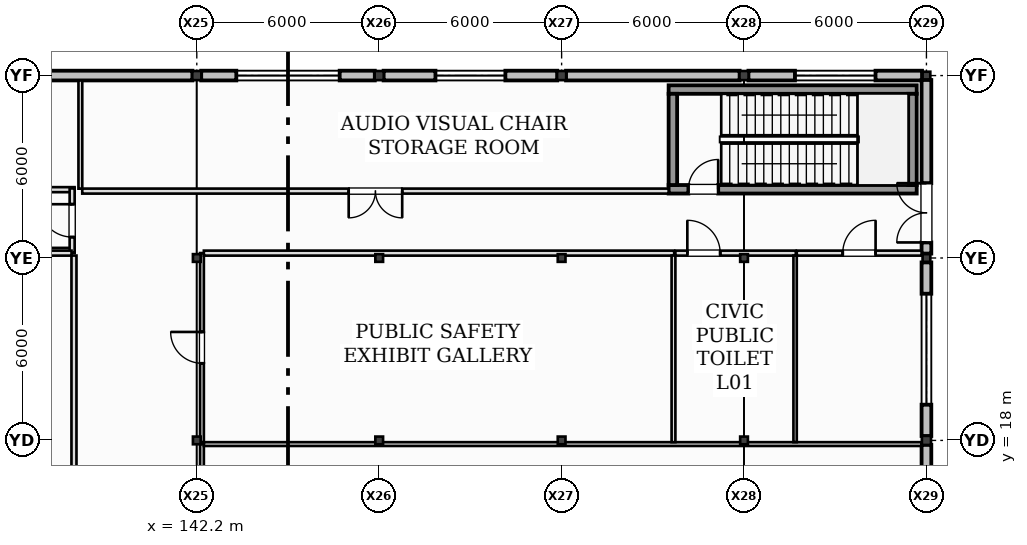
"""IFC4 building model, lengths in metres.
Left out: names, types, materials, properties, quantities, classifications, styles, units other than length and angle.
Written with IfcOpenShell. Run it as: python <this file> out.ifc"""

import sys

from ifc_helpers import new_model, si_unit, direction, frame, frame_2d, origin, origin_2d, place, context, subcontext, project, spatial, rectangle, hollow_rectangle, i_section, extrude, element, fill, save


model = new_model("IFC4")
c1 = context("Model", 3, precision=1e-05, world=origin(), true_north=direction((0.0, 1.0)))
c2 = subcontext(c1, "Body", "Model", "MODEL_VIEW")
j1 = project(units=[si_unit("LENGTHUNIT", "METRE"), si_unit("PLANEANGLEUNIT", "RADIAN")], contexts=[c1])
p1 = place(None, origin())
s1 = spatial("IfcSite", under=j1, at=p1, CompositionType="ELEMENT")
p2 = place(p1, origin())
s2 = spatial("IfcBuilding", under=s1, at=p2, CompositionType="ELEMENT")
p3 = place(p2, origin())
s3 = spatial("IfcBuildingStorey", under=s2, at=p3, CompositionType="ELEMENT", Elevation=0.0)
for number, where, z_axis, x_axis in (
    (1, (142.2, 18.0, -0.41), (0.0, 0.0, 1.0), (1.0, 0.0, 0.0)),
    (2, (142.2, 24.0, -0.41), (0.0, 0.0, 1.0), (1.0, 0.0, 0.0)),
):
    element("IfcColumn", number, at=place(p3, frame(where, z_axis=z_axis, x_axis=x_axis)), inside=s3, PredefinedType="COLUMN", context=c2, shape_type="SweptSolid", body=[
        extrude(i_section(OverallWidth=0.254, OverallDepth=0.253, WebThickness=0.009, FlangeThickness=0.014, at=origin_2d()), origin(), (0.0, 0.0, 1.0), 6.41),
    ])
p4 = place(p3, frame((142.2, 30.0, -0.41), z_axis=(0.0, 0.0, 1.0), x_axis=(1.0, 0.0, 0.0)))
e3 = element("IfcColumn", 3, at=p4, inside=s3, PredefinedType="COLUMN", context=c2, shape_type="SweptSolid", body=[
    extrude(hollow_rectangle(XDim=0.3, YDim=0.3, WallThickness=0.012, at=origin_2d()), origin(), (0.0, 0.0, 1.0), 6.41),
])
for number, where, z_axis, x_axis in (
    (4, (148.2, 18.0, -0.41), (0.0, 0.0, 1.0), (1.0, 0.0, 0.0)),
    (5, (148.2, 24.0, -0.41), (0.0, 0.0, 1.0), (1.0, 0.0, 0.0)),
):
    element("IfcColumn", number, at=place(p3, frame(where, z_axis=z_axis, x_axis=x_axis)), inside=s3, PredefinedType="COLUMN", context=c2, shape_type="SweptSolid", body=[
        extrude(i_section(OverallWidth=0.254, OverallDepth=0.253, WebThickness=0.009, FlangeThickness=0.014, at=origin_2d()), origin(), (0.0, 0.0, 1.0), 6.41),
    ])
p5 = place(p3, frame((148.2, 30.0, -0.41), z_axis=(0.0, 0.0, 1.0), x_axis=(1.0, 0.0, 0.0)))
e6 = element("IfcColumn", 6, at=p5, inside=s3, PredefinedType="COLUMN", context=c2, shape_type="SweptSolid", body=[
    extrude(hollow_rectangle(XDim=0.3, YDim=0.3, WallThickness=0.012, at=origin_2d()), origin(), (0.0, 0.0, 1.0), 6.41),
])
for number, where, z_axis, x_axis in (
    (7, (154.2, 18.0, -0.41), (0.0, 0.0, 1.0), (1.0, 0.0, 0.0)),
    (8, (154.2, 24.0, -0.41), (0.0, 0.0, 1.0), (1.0, 0.0, 0.0)),
):
    element("IfcColumn", number, at=place(p3, frame(where, z_axis=z_axis, x_axis=x_axis)), inside=s3, PredefinedType="COLUMN", context=c2, shape_type="SweptSolid", body=[
        extrude(i_section(OverallWidth=0.254, OverallDepth=0.253, WebThickness=0.009, FlangeThickness=0.014, at=origin_2d()), origin(), (0.0, 0.0, 1.0), 6.41),
    ])
p6 = place(p3, frame((154.2, 30.0, -0.41), z_axis=(0.0, 0.0, 1.0), x_axis=(1.0, 0.0, 0.0)))
e9 = element("IfcColumn", 9, at=p6, inside=s3, PredefinedType="COLUMN", context=c2, shape_type="SweptSolid", body=[
    extrude(hollow_rectangle(XDim=0.3, YDim=0.3, WallThickness=0.012, at=origin_2d()), origin(), (0.0, 0.0, 1.0), 6.41),
])
for number, where, z_axis, x_axis in (
    (10, (160.2, 18.0, -0.41), (0.0, 0.0, 1.0), (1.0, 0.0, 0.0)),
    (11, (160.2, 24.0, -0.41), (0.0, 0.0, 1.0), (1.0, 0.0, 0.0)),
):
    element("IfcColumn", number, at=place(p3, frame(where, z_axis=z_axis, x_axis=x_axis)), inside=s3, PredefinedType="COLUMN", context=c2, shape_type="SweptSolid", body=[
        extrude(i_section(OverallWidth=0.254, OverallDepth=0.253, WebThickness=0.009, FlangeThickness=0.014, at=origin_2d()), origin(), (0.0, 0.0, 1.0), 6.41),
    ])
for number, where, z_axis, x_axis in (
    (12, (160.2, 30.0, -0.41), (0.0, 0.0, 1.0), (1.0, 0.0, 0.0)),
    (13, (166.2, 18.0, -0.41), (0.0, 0.0, 1.0), (1.0, 0.0, 0.0)),
):
    element("IfcColumn", number, at=place(p3, frame(where, z_axis=z_axis, x_axis=x_axis)), inside=s3, PredefinedType="COLUMN", context=c2, shape_type="SweptSolid", body=[
        extrude(hollow_rectangle(XDim=0.3, YDim=0.3, WallThickness=0.012, at=origin_2d()), origin(), (0.0, 0.0, 1.0), 6.41),
    ])
for number, where, z_axis, x_axis in (
    (14, (166.2, 24.0, -0.41), (0.0, 0.0, 1.0), (1.0, 0.0, 0.0)),
    (15, (166.2, 30.0, -0.41), (0.0, 0.0, 1.0), (1.0, 0.0, 0.0)),
):
    element("IfcColumn", number, at=place(p3, frame(where, z_axis=z_axis, x_axis=x_axis)), inside=s3, PredefinedType="COLUMN", context=c2, shape_type="SweptSolid", body=[
        extrude(i_section(OverallWidth=0.254, OverallDepth=0.253, WebThickness=0.009, FlangeThickness=0.014, at=origin_2d()), origin(), (0.0, 0.0, 1.0), 6.41),
    ])
p7 = place(p3, frame((142.055, 30.0, 0.0), z_axis=(0.0, 0.0, 1.0), x_axis=(-1.0, 0.0, 0.0)))
e16 = element("IfcWall", 16, at=p7, inside=s3, PredefinedType="STANDARD", context=c2, shape_type="SweptSolid", body=[
    extrude(rectangle(XDim=5.71, YDim=0.32, at=frame_2d((2.855, 0.0))), origin(), (0.0, 0.0, 1.0), 5.035),
])
p8 = place(p3, frame((148.055, 30.0, 0.0), z_axis=(0.0, 0.0, 1.0), x_axis=(-1.0, 0.0, 0.0)))
e17 = element("IfcWall", 17, at=p8, inside=s3, PredefinedType="STANDARD", context=c2, shape_type="SweptSolid", body=[
    extrude(rectangle(XDim=5.71, YDim=0.32, at=frame_2d((2.855, 0.0))), origin(), (0.0, 0.0, 1.0), 5.035),
])
p9 = place(p8, frame((1.155, 0.0, 0.85)))
e18 = element("IfcOpeningElement", 18, at=p9, cuts=e17, PredefinedType="OPENING", context=c2, shape_type="SweptSolid", body=[
    extrude(rectangle(XDim=3.4, YDim=1.75, at=frame_2d((1.7, 0.875))), frame((0.0, 0.17, 0.0), z_axis=(0.0, -1.0, 0.0), x_axis=(1.0, 0.0, 0.0)), (0.0, 0.0, 1.0), 0.34),
])
p10 = place(p3, frame((154.055, 30.0, 0.0), z_axis=(0.0, 0.0, 1.0), x_axis=(-1.0, 0.0, 0.0)))
e19 = element("IfcWall", 19, at=p10, inside=s3, PredefinedType="STANDARD", context=c2, shape_type="SweptSolid", body=[
    extrude(rectangle(XDim=5.71, YDim=0.32, at=frame_2d((2.855, 0.0))), origin(), (0.0, 0.0, 1.0), 5.035),
])
p11 = place(p10, frame((1.705, 0.0, 1.0)))
e20 = element("IfcOpeningElement", 20, at=p11, cuts=e19, PredefinedType="OPENING", context=c2, shape_type="SweptSolid", body=[
    extrude(rectangle(XDim=2.3, YDim=0.88, at=frame_2d((1.15, 0.44))), frame((0.0, 0.17, 0.0), z_axis=(0.0, -1.0, 0.0), x_axis=(1.0, 0.0, 0.0)), (0.0, 0.0, 1.0), 0.34),
])
p12 = place(p3, frame((160.055, 30.0, 0.0), z_axis=(0.0, 0.0, 1.0), x_axis=(-1.0, 0.0, 0.0)))
e21 = element("IfcWall", 21, at=p12, inside=s3, PredefinedType="STANDARD", context=c2, shape_type="SweptSolid", body=[
    extrude(rectangle(XDim=5.71, YDim=0.32, at=frame_2d((2.855, 0.0))), origin(), (0.0, 0.0, 1.0), 5.035),
])
p13 = place(p3, frame((166.055, 30.0, 0.0), z_axis=(0.0, 0.0, 1.0), x_axis=(-1.0, 0.0, 0.0)))
e22 = element("IfcWall", 22, at=p13, inside=s3, PredefinedType="STANDARD", context=c2, shape_type="SweptSolid", body=[
    extrude(rectangle(XDim=5.71, YDim=0.32, at=frame_2d((2.855, 0.0))), origin(), (0.0, 0.0, 1.0), 5.035),
])
p14 = place(p13, frame((1.53, 0.0, 1.0)))
e23 = element("IfcOpeningElement", 23, at=p14, cuts=e22, PredefinedType="OPENING", context=c2, shape_type="SweptSolid", body=[
    extrude(rectangle(XDim=2.65, YDim=0.88, at=frame_2d((1.325, 0.44))), frame((0.0, 0.17, 0.0), z_axis=(0.0, -1.0, 0.0), x_axis=(1.0, 0.0, 0.0)), (0.0, 0.0, 1.0), 0.34),
])
p15 = place(p3, frame((166.2, 13.945, 0.0), z_axis=(0.0, 0.0, 1.0), x_axis=(0.0, 1.0, 0.0)))
e24 = element("IfcWall", 24, at=p15, inside=s3, PredefinedType="STANDARD", context=c2, shape_type="SweptSolid", body=[
    extrude(rectangle(XDim=3.91, YDim=0.32, at=frame_2d((1.955, 0.0))), origin(), (0.0, 0.0, 1.0), 5.044),
])
p16 = place(p15, frame((1.265, 0.0, 1.0)))
e25 = element("IfcOpeningElement", 25, at=p16, cuts=e24, PredefinedType="OPENING", context=c2, shape_type="SweptSolid", body=[
    extrude(rectangle(XDim=1.38, YDim=1.38, at=frame_2d((0.69, 0.69))), frame((0.0, 0.17, 0.0), z_axis=(0.0, -1.0, 0.0), x_axis=(1.0, 0.0, 0.0)), (0.0, 0.0, 1.0), 0.34),
])
p17 = place(p3, frame((166.2, 18.145, 0.0), z_axis=(0.0, 0.0, 1.0), x_axis=(0.0, 1.0, 0.0)))
e26 = element("IfcWall", 26, at=p17, inside=s3, PredefinedType="STANDARD", context=c2, shape_type="SweptSolid", body=[
    extrude(rectangle(XDim=5.71, YDim=0.32, at=frame_2d((2.855, 0.0))), origin(), (0.0, 0.0, 1.0), 5.044),
])
p18 = place(p17, frame((1.03, 0.0, 1.0)))
e27 = element("IfcOpeningElement", 27, at=p18, cuts=e26, PredefinedType="OPENING", context=c2, shape_type="SweptSolid", body=[
    extrude(rectangle(XDim=3.65, YDim=1.08, at=frame_2d((1.825, 0.54))), frame((0.0, 0.17, 0.0), z_axis=(0.0, -1.0, 0.0), x_axis=(1.0, 0.0, 0.0)), (0.0, 0.0, 1.0), 0.34),
])
p19 = place(p3, frame((166.2, 24.145, 0.0), z_axis=(0.0, 0.0, 1.0), x_axis=(0.0, 1.0, 0.0)))
e28 = element("IfcWall", 28, at=p19, inside=s3, PredefinedType="STANDARD", context=c2, shape_type="SweptSolid", body=[
    extrude(rectangle(XDim=5.71, YDim=0.32, at=frame_2d((2.855, 0.0))), origin(), (0.0, 0.0, 1.0), 5.044),
])
p20 = place(p19, frame((0.366, 0.0, 0.0)))
e29 = element("IfcOpeningElement", 29, at=p20, cuts=e28, PredefinedType="OPENING", context=c2, shape_type="SweptSolid", body=[
    extrude(rectangle(XDim=1.95, YDim=2.35, at=frame_2d((0.975, 1.175))), frame((0.0, 0.17, 0.0), z_axis=(0.0, -1.0, 0.0), x_axis=(1.0, 0.0, 0.0)), (0.0, 0.0, 1.0), 0.34),
])
p21 = place(p3, frame((157.72, 26.26, 0.0), z_axis=(0.0, 0.0, 1.0), x_axis=(1.0, 0.0, 0.0)))
e30 = element("IfcWall", 30, at=p21, inside=s3, PredefinedType="SHEAR", context=c2, shape_type="SweptSolid", body=[
    extrude(rectangle(XDim=8.16, YDim=0.28, at=frame_2d((4.08, 0.0))), origin(), (0.0, 0.0, 1.0), 6.0),
])
p22 = place(p21, frame((0.65, 0.0, 0.0)))
e31 = element("IfcOpeningElement", 31, at=p22, cuts=e30, PredefinedType="OPENING", context=c2, shape_type="SweptSolid", body=[
    extrude(rectangle(XDim=0.98, YDim=2.15, at=frame_2d((0.49, 1.075))), frame((0.0, 0.15, 0.0), z_axis=(0.0, -1.0, 0.0), x_axis=(1.0, 0.0, 0.0)), (0.0, 0.0, 1.0), 0.3),
])
p23 = place(p3, frame((165.88, 29.54, 0.0), z_axis=(0.0, 0.0, 1.0), x_axis=(-1.0, 0.0, 0.0)))
e32 = element("IfcWall", 32, at=p23, inside=s3, PredefinedType="SHEAR", context=c2, shape_type="SweptSolid", body=[
    extrude(rectangle(XDim=8.16, YDim=0.28, at=frame_2d((4.08, 0.0))), origin(), (0.0, 0.0, 1.0), 6.0),
])
for number, where, z_axis, x_axis in (
    (33, (157.86, 29.4, 0.0), (0.0, 0.0, 1.0), (0.0, -1.0, 0.0)),
    (34, (165.74, 26.4, 0.0), (0.0, 0.0, 1.0), (0.0, 1.0, 0.0)),
):
    element("IfcWall", number, at=place(p3, frame(where, z_axis=z_axis, x_axis=x_axis)), inside=s3, PredefinedType="SHEAR", context=c2, shape_type="SweptSolid", body=[
        extrude(rectangle(XDim=3.0, YDim=0.28, at=frame_2d((1.5, 0.0))), origin(), (0.0, 0.0, 1.0), 6.0),
    ])
p24 = place(p3, frame((133.02, 24.25, 0.0), z_axis=(0.0, 0.0, 1.0), x_axis=(1.0, 0.0, 0.0)))
e35 = element("IfcWall", 35, at=p24, inside=s3, PredefinedType="PARTITIONING", context=c2, shape_type="SweptSolid", body=[
    extrude(rectangle(XDim=5.16, YDim=0.165, at=frame_2d((2.58, 0.0))), origin(), (0.0, 0.0, 1.0), 5.035),
])
p25 = place(p3, frame((137.065, 26.248, 0.0), z_axis=(0.0, 0.0, 1.0), x_axis=(1.0, 0.0, 0.0)))
e36 = element("IfcWall", 36, at=p25, inside=s3, PredefinedType="PARTITIONING", context=c2, shape_type="SweptSolid", body=[
    extrude(rectangle(XDim=1.115, YDim=0.165, at=frame_2d((0.558, 0.0))), origin(), (0.0, 0.0, 1.0), 5.68),
])
p26 = place(p3, frame((138.1, 24.17, 0.0), z_axis=(0.0, 0.0, 1.0), x_axis=(0.0, 1.0, 0.0)))
e37 = element("IfcWall", 37, at=p26, inside=s3, PredefinedType="PARTITIONING", context=c2, shape_type="SweptSolid", body=[
    extrude(rectangle(XDim=2.118, YDim=0.165, at=frame_2d((1.059, 0.0))), origin(), (0.0, 0.0, 1.0), 5.294),
])
p27 = place(p26, frame((0.519, 0.0, 0.0)))
e38 = element("IfcOpeningElement", 38, at=p27, cuts=e37, PredefinedType="OPENING", context=c2, shape_type="SweptSolid", body=[
    extrude(rectangle(XDim=1.08, YDim=2.14, at=frame_2d((0.54, 1.07))), frame((0.0, 0.093, 0.0), z_axis=(0.0, -1.0, 0.0), x_axis=(1.0, 0.0, 0.0)), (0.0, 0.0, 1.0), 0.185),
])
p28 = place(p3, frame((142.37, 1.945, 0.0), z_axis=(0.0, 0.0, 1.0), x_axis=(0.0, 1.0, 0.0)))
e39 = element("IfcWall", 39, at=p28, inside=s3, PredefinedType="PARTITIONING", context=c2, shape_type="SweptSolid", body=[
    extrude(rectangle(XDim=15.938, YDim=0.125, at=frame_2d((7.969, 0.0))), origin(), (0.0, 0.0, 1.0), 5.044),
])
p29 = place(p28, frame((7.268, 0.0, 0.0)))
e40 = element("IfcOpeningElement", 40, at=p29, cuts=e39, PredefinedType="OPENING", context=c2, shape_type="SweptSolid", body=[
    extrude(rectangle(XDim=1.18, YDim=2.16, at=frame_2d((0.59, 1.08))), frame((0.0, 0.073, 0.0), z_axis=(0.0, -1.0, 0.0), x_axis=(1.0, 0.0, 0.0)), (0.0, 0.0, 1.0), 0.145),
])
p30 = place(p3, frame((142.433, 17.88, 0.0), z_axis=(0.0, 0.0, 1.0), x_axis=(1.0, 0.0, 0.0)))
e41 = element("IfcWall", 41, at=p30, inside=s3, PredefinedType="PARTITIONING", context=c2, shape_type="SweptSolid", body=[
    extrude(rectangle(XDim=23.607, YDim=0.125, at=frame_2d((11.804, 0.0))), origin(), (0.0, 0.0, 1.0), 5.035),
])
p31 = place(p3, frame((124.397, 24.16, 0.0), z_axis=(0.0, 0.0, 1.0), x_axis=(1.0, 0.0, 0.0)))
e42 = element("IfcWall", 42, at=p31, inside=s3, PredefinedType="PARTITIONING", context=c2, shape_type="SweptSolid", body=[
    extrude(rectangle(XDim=13.683, YDim=0.165, at=frame_2d((6.841, 0.0))), origin(), (0.0, 0.0, 1.0), 5.035),
])
p32 = place(p31, frame((6.61, 0.0, 0.0)))
e43 = element("IfcOpeningElement", 43, at=p32, cuts=e42, PredefinedType="OPENING", context=c2, shape_type="SweptSolid", body=[
    extrude(rectangle(XDim=1.13, YDim=2.18, at=frame_2d((0.565, 1.09))), frame((0.0, 0.093, 0.0), z_axis=(0.0, -1.0, 0.0), x_axis=(1.0, 0.0, 0.0)), (0.0, 0.0, 1.0), 0.185),
])
p33 = place(p3, frame((138.16, 24.08, 0.0), z_axis=(0.0, 0.0, 1.0), x_axis=(0.0, -1.0, 0.0)))
e44 = element("IfcWall", 44, at=p33, inside=s3, PredefinedType="PARTITIONING", context=c2, shape_type="SweptSolid", body=[
    extrude(rectangle(XDim=10.338, YDim=0.165, at=frame_2d((5.169, 0.0))), origin(), (0.0, 0.0, 1.0), 5.249),
])
p34 = place(p3, frame((142.37, 17.942, 0.0), z_axis=(0.0, 0.0, 1.0), x_axis=(0.0, 1.0, 0.0)))
e45 = element("IfcWall", 45, at=p34, inside=s3, PredefinedType="PARTITIONING", context=c2, shape_type="SweptSolid", body=[
    extrude(rectangle(XDim=6.22, YDim=0.125, at=frame_2d((3.11, 0.0))), origin(), (0.0, 0.0, 1.0), 5.044),
])
p35 = place(p34, frame((2.595, 0.0, 0.0)))
e46 = element("IfcOpeningElement", 46, at=p35, cuts=e45, PredefinedType="OPENING", context=c2, shape_type="SweptSolid", body=[
    extrude(rectangle(XDim=1.03, YDim=2.15, at=frame_2d((0.515, 1.075))), frame((0.0, 0.073, 0.0), z_axis=(0.0, -1.0, 0.0), x_axis=(1.0, 0.0, 0.0)), (0.0, 0.0, 1.0), 0.145),
])
p36 = place(p3, frame((142.433, 24.16, 0.0), z_axis=(0.0, 0.0, 1.0), x_axis=(1.0, 0.0, 0.0)))
e47 = element("IfcWall", 47, at=p36, inside=s3, PredefinedType="PARTITIONING", context=c2, shape_type="SweptSolid", body=[
    extrude(rectangle(XDim=15.47, YDim=0.165, at=frame_2d((7.735, 0.0))), origin(), (0.0, 0.0, 1.0), 5.035),
])
p37 = place(p3, frame((157.88, 24.08, 0.0), z_axis=(0.0, 0.0, 1.0), x_axis=(0.0, -1.0, 0.0)))
e48 = element("IfcWall", 48, at=p37, inside=s3, PredefinedType="PARTITIONING", context=c2, shape_type="SweptSolid", body=[
    extrude(rectangle(XDim=6.138, YDim=0.125, at=frame_2d((3.069, 0.0))), origin(), (0.0, 0.0, 1.0), 5.339),
])
p38 = place(p3, frame((157.942, 24.16, 0.0), z_axis=(0.0, 0.0, 1.0), x_axis=(1.0, 0.0, 0.0)))
e49 = element("IfcWall", 49, at=p38, inside=s3, PredefinedType="PARTITIONING", context=c2, shape_type="SweptSolid", body=[
    extrude(rectangle(XDim=3.96, YDim=0.165, at=frame_2d((1.98, 0.0))), origin(), (0.0, 0.0, 1.0), 5.035),
])
p39 = place(p38, frame((0.393, 0.0, 0.0)))
e50 = element("IfcOpeningElement", 50, at=p39, cuts=e49, PredefinedType="OPENING", context=c2, shape_type="SweptSolid", body=[
    extrude(rectangle(XDim=1.08, YDim=2.14, at=frame_2d((0.54, 1.07))), frame((0.0, 0.093, 0.0), z_axis=(0.0, -1.0, 0.0), x_axis=(1.0, 0.0, 0.0)), (0.0, 0.0, 1.0), 0.185),
])
p40 = place(p3, frame((161.88, 24.08, 0.0), z_axis=(0.0, 0.0, 1.0), x_axis=(0.0, -1.0, 0.0)))
e51 = element("IfcWall", 51, at=p40, inside=s3, PredefinedType="PARTITIONING", context=c2, shape_type="SweptSolid", body=[
    extrude(rectangle(XDim=6.138, YDim=0.11, at=frame_2d((3.069, 0.0))), origin(), (0.0, 0.0, 1.0), 5.39),
])
p41 = place(p3, frame((161.935, 24.16, 0.0), z_axis=(0.0, 0.0, 1.0), x_axis=(1.0, 0.0, 0.0)))
e52 = element("IfcWall", 52, at=p41, inside=s3, PredefinedType="PARTITIONING", context=c2, shape_type="SweptSolid", body=[
    extrude(rectangle(XDim=4.105, YDim=0.165, at=frame_2d((2.052, 0.0))), origin(), (0.0, 0.0, 1.0), 5.035),
])
p42 = place(p41, frame((1.512, 0.0, 0.0)))
e53 = element("IfcOpeningElement", 53, at=p42, cuts=e52, PredefinedType="OPENING", context=c2, shape_type="SweptSolid", body=[
    extrude(rectangle(XDim=1.08, YDim=2.14, at=frame_2d((0.54, 1.07))), frame((0.0, 0.093, 0.0), z_axis=(0.0, -1.0, 0.0), x_axis=(1.0, 0.0, 0.0)), (0.0, 0.0, 1.0), 0.185),
])
p43 = place(p3, frame((138.37, 26.28, 0.0), z_axis=(0.0, 0.0, 1.0), x_axis=(0.0, 1.0, 0.0)))
e54 = element("IfcWall", 54, at=p43, inside=s3, PredefinedType="PARTITIONING", context=c2, shape_type="SweptSolid", body=[
    extrude(rectangle(XDim=3.56, YDim=0.125, at=frame_2d((1.78, 0.0))), origin(), (0.0, 0.0, 1.0), 5.294),
])
p44 = place(p3, frame((157.72, 26.2, 0.0), z_axis=(0.0, 0.0, 1.0), x_axis=(-1.0, 0.0, 0.0)))
e55 = element("IfcWall", 55, at=p44, inside=s3, PredefinedType="PARTITIONING", context=c2, shape_type="SweptSolid", body=[
    extrude(rectangle(XDim=19.287, YDim=0.165, at=frame_2d((9.644, 0.0))), origin(), (0.0, 0.0, 1.0), 5.68),
])
p45 = place(p44, frame((8.764, 0.0, 0.0)))
e56 = element("IfcOpeningElement", 56, at=p45, cuts=e55, PredefinedType="OPENING", context=c2, shape_type="SweptSolid", body=[
    extrude(rectangle(XDim=1.76, YDim=2.26, at=frame_2d((0.88, 1.13))), frame((0.0, 0.093, 0.0), z_axis=(0.0, -1.0, 0.0), x_axis=(1.0, 0.0, 0.0)), (0.0, 0.0, 1.0), 0.185),
])
p46 = place(p9, origin())
e57 = element("IfcWindow", 57, at=p46, inside=s3, PartitioningType="SINGLE_PANEL", PredefinedType="WINDOW", context=c2, shape_type="SweptSolid", body=[
    extrude(rectangle(XDim=3.4, YDim=1.75, at=frame_2d((1.7, 0.875))), frame((0.0, 0.03, 0.0), z_axis=(0.0, -1.0, 0.0), x_axis=(1.0, 0.0, 0.0)), (0.0, 0.0, 1.0), 0.06),
])
fill(e18, e57)
p47 = place(p11, origin())
e58 = element("IfcWindow", 58, at=p47, inside=s3, PartitioningType="SINGLE_PANEL", PredefinedType="WINDOW", context=c2, shape_type="SweptSolid", body=[
    extrude(rectangle(XDim=2.3, YDim=0.88, at=frame_2d((1.15, 0.44))), frame((0.0, 0.03, 0.0), z_axis=(0.0, -1.0, 0.0), x_axis=(1.0, 0.0, 0.0)), (0.0, 0.0, 1.0), 0.06),
])
fill(e20, e58)
p48 = place(p14, origin())
e59 = element("IfcWindow", 59, at=p48, inside=s3, PartitioningType="SINGLE_PANEL", PredefinedType="WINDOW", context=c2, shape_type="SweptSolid", body=[
    extrude(rectangle(XDim=2.65, YDim=0.88, at=frame_2d((1.325, 0.44))), frame((0.0, 0.03, 0.0), z_axis=(0.0, -1.0, 0.0), x_axis=(1.0, 0.0, 0.0)), (0.0, 0.0, 1.0), 0.06),
])
fill(e23, e59)
p49 = place(p18, origin())
e60 = element("IfcWindow", 60, at=p49, inside=s3, PartitioningType="SINGLE_PANEL", PredefinedType="WINDOW", context=c2, shape_type="SweptSolid", body=[
    extrude(rectangle(XDim=3.65, YDim=1.08, at=frame_2d((1.825, 0.54))), frame((0.0, 0.03, 0.0), z_axis=(0.0, -1.0, 0.0), x_axis=(1.0, 0.0, 0.0)), (0.0, 0.0, 1.0), 0.06),
])
fill(e27, e60)
p50 = place(p20, frame((1.95, 0.0, 0.0), z_axis=(0.0, 0.0, 1.0), x_axis=(-1.0, 0.0, 0.0)))
e61 = element("IfcDoor", 61, at=p50, inside=s3, OperationType="DOUBLE_DOOR_SINGLE_SWING", PredefinedType="DOOR", context=c2, shape_type="SweptSolid", body=[
    extrude(rectangle(XDim=1.95, YDim=2.35, at=frame_2d((0.975, 1.175))), frame((0.0, 0.025, 0.0), z_axis=(0.0, -1.0, 0.0), x_axis=(1.0, 0.0, 0.0)), (0.0, 0.0, 1.0), 0.05),
])
fill(e29, e61)
p51 = place(p22, origin())
e62 = element("IfcDoor", 62, at=p51, inside=s3, OperationType="SINGLE_SWING_RIGHT", PredefinedType="DOOR", context=c2, shape_type="SweptSolid", body=[
    extrude(rectangle(XDim=0.98, YDim=2.15, at=frame_2d((0.49, 1.075))), frame((0.0, 0.025, 0.0), z_axis=(0.0, -1.0, 0.0), x_axis=(1.0, 0.0, 0.0)), (0.0, 0.0, 1.0), 0.05),
])
fill(e31, e62)
p52 = place(p27, origin())
e63 = element("IfcDoor", 63, at=p52, inside=s3, OperationType="SINGLE_SWING_RIGHT", PredefinedType="DOOR", context=c2, shape_type="SweptSolid", body=[
    extrude(rectangle(XDim=1.08, YDim=2.14, at=frame_2d((0.54, 1.07))), frame((0.0, 0.025, 0.0), z_axis=(0.0, -1.0, 0.0), x_axis=(1.0, 0.0, 0.0)), (0.0, 0.0, 1.0), 0.05),
])
fill(e38, e63)
p53 = place(p35, origin())
e64 = element("IfcDoor", 64, at=p53, inside=s3, OperationType="SINGLE_SWING_RIGHT", PredefinedType="DOOR", context=c2, shape_type="SweptSolid", body=[
    extrude(rectangle(XDim=1.03, YDim=2.15, at=frame_2d((0.515, 1.075))), frame((0.0, 0.025, 0.0), z_axis=(0.0, -1.0, 0.0), x_axis=(1.0, 0.0, 0.0)), (0.0, 0.0, 1.0), 0.05),
])
fill(e46, e64)
p54 = place(p39, frame((1.08, 0.0, 0.0), z_axis=(0.0, 0.0, 1.0), x_axis=(-1.0, 0.0, 0.0)))
e65 = element("IfcDoor", 65, at=p54, inside=s3, OperationType="SINGLE_SWING_LEFT", PredefinedType="DOOR", context=c2, shape_type="SweptSolid", body=[
    extrude(rectangle(XDim=1.08, YDim=2.14, at=frame_2d((0.54, 1.07))), frame((0.0, 0.025, 0.0), z_axis=(0.0, -1.0, 0.0), x_axis=(1.0, 0.0, 0.0)), (0.0, 0.0, 1.0), 0.05),
])
fill(e50, e65)
p55 = place(p42, frame((1.08, 0.0, 0.0), z_axis=(0.0, 0.0, 1.0), x_axis=(-1.0, 0.0, 0.0)))
e66 = element("IfcDoor", 66, at=p55, inside=s3, OperationType="SINGLE_SWING_RIGHT", PredefinedType="DOOR", context=c2, shape_type="SweptSolid", body=[
    extrude(rectangle(XDim=1.08, YDim=2.14, at=frame_2d((0.54, 1.07))), frame((0.0, 0.025, 0.0), z_axis=(0.0, -1.0, 0.0), x_axis=(1.0, 0.0, 0.0)), (0.0, 0.0, 1.0), 0.05),
])
fill(e53, e66)
p56 = place(p45, frame((1.76, 0.0, 0.0), z_axis=(0.0, 0.0, 1.0), x_axis=(-1.0, 0.0, 0.0)))
e67 = element("IfcDoor", 67, at=p56, inside=s3, OperationType="DOUBLE_DOOR_SINGLE_SWING", PredefinedType="DOOR", context=c2, shape_type="SweptSolid", body=[
    extrude(rectangle(XDim=1.76, YDim=2.26, at=frame_2d((0.88, 1.13))), frame((0.0, 0.025, 0.0), z_axis=(0.0, -1.0, 0.0), x_axis=(1.0, 0.0, 0.0)), (0.0, 0.0, 1.0), 0.05),
])
fill(e56, e67)
save(model, sys.argv[1])
